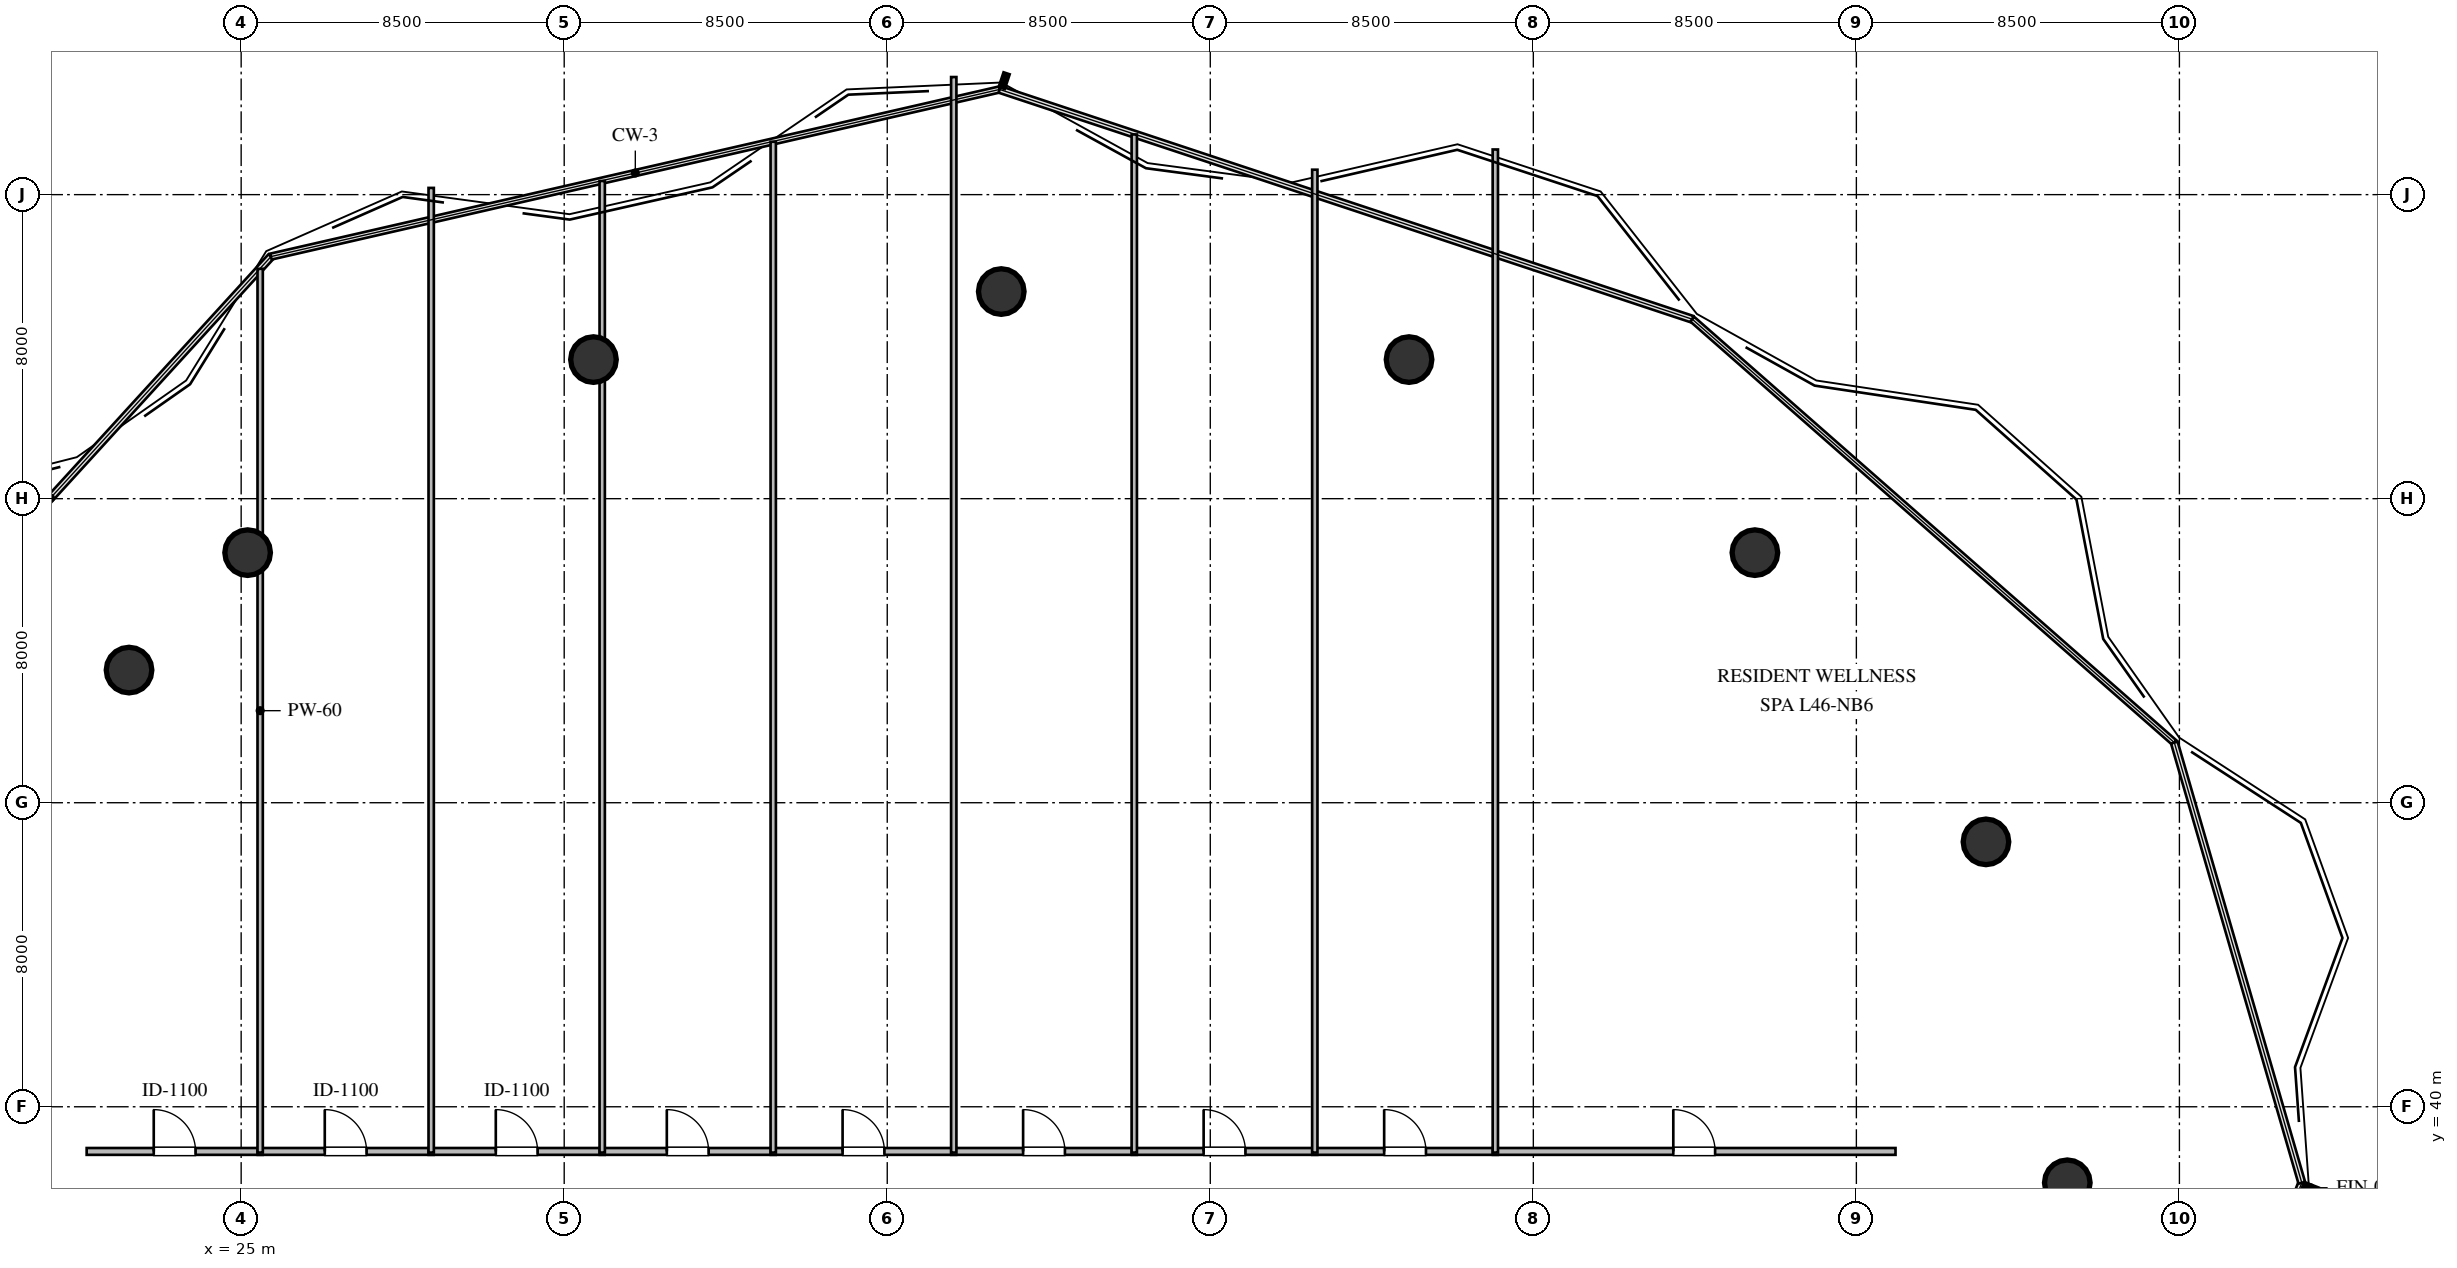
"""IFC4 building model, lengths in metres.
Left out: names, types, materials, properties, quantities, classifications, styles, units other than length and angle.
Written with IfcOpenShell. Run it as: python <this file> out.ifc"""

import sys

from ifc_helpers import new_model, si_unit, direction, frame, frame_2d, origin, origin_2d, place, context, subcontext, project, spatial, rectangle, circle, extrude, element, fill, save


model = new_model("IFC4")
c1 = context("Model", 3, precision=1e-05, world=origin(), true_north=direction((0.0, 1.0)))
c2 = subcontext(c1, "Body", "Model", "MODEL_VIEW")
j1 = project(units=[si_unit("LENGTHUNIT", "METRE"), si_unit("PLANEANGLEUNIT", "RADIAN")], contexts=[c1])
p1 = place(None, origin())
s1 = spatial("IfcSite", under=j1, at=p1, CompositionType="ELEMENT")
p2 = place(p1, origin())
s2 = spatial("IfcBuilding", under=s1, at=p2, CompositionType="ELEMENT")
p3 = place(p2, frame((0.0, 0.0, 174.6)))
s3 = spatial("IfcBuildingStorey", under=s2, at=p3, CompositionType="ELEMENT", Elevation=174.6)
for number, where, z_axis, x_axis in (
    (1, (73.05, 38.0, 0.0), (0.0, 0.0, 1.0), (1.0, 0.0, 0.0)),
    (2, (70.91, 46.97, 0.0), (0.0, 0.0, 1.0), (1.0, 0.0, 0.0)),
    (3, (64.83, 54.58, 0.0), (0.0, 0.0, 1.0), (1.0, 0.0, 0.0)),
    (4, (55.73, 59.66, 0.0), (0.0, 0.0, 1.0), (1.0, 0.0, 0.0)),
    (5, (45.0, 61.45, 0.0), (0.0, 0.0, 1.0), (1.0, 0.0, 0.0)),
    (6, (34.27, 59.66, 0.0), (0.0, 0.0, 1.0), (1.0, 0.0, 0.0)),
    (7, (25.17, 54.58, 0.0), (0.0, 0.0, 1.0), (1.0, 0.0, 0.0)),
    (8, (22.05, 51.49, 0.0), (0.0, 0.0, 1.0), (1.0, 0.0, 0.0)),
):
    element("IfcColumn", number, at=place(p3, frame(where, z_axis=z_axis, x_axis=x_axis)), inside=s3, PredefinedType="COLUMN", context=c2, shape_type="SweptSolid", body=[
        extrude(circle(Radius=0.6, at=origin_2d()), origin(), (0.0, 0.0, 1.0), 3.6),
    ])
p4 = place(p3, frame((20.935, 38.825, 0.0), z_axis=(0.0, 0.0, 1.0), x_axis=(1.0, 0.0, 0.0)))
e9 = element("IfcWall", 9, at=p4, inside=s3, PredefinedType="PARTITIONING", context=c2, shape_type="SweptSolid", body=[
    extrude(rectangle(XDim=4.63, YDim=0.18, at=frame_2d((2.315, 0.0))), origin(), (0.0, 0.0, 1.0), 3.36),
])
p5 = place(p4, frame((1.765, 0.0, 0.0)))
e10 = element("IfcOpeningElement", 10, at=p5, cuts=e9, PredefinedType="OPENING", context=c2, shape_type="SweptSolid", body=[
    extrude(rectangle(XDim=1.1, YDim=2.1, at=frame_2d((0.55, 1.05))), frame((0.0, 0.1, 0.0), z_axis=(0.0, -1.0, 0.0), x_axis=(1.0, 0.0, 0.0)), (0.0, 0.0, 1.0), 0.2),
])
p6 = place(p3, frame((25.435, 38.825, 0.0), z_axis=(0.0, 0.0, 1.0), x_axis=(1.0, 0.0, 0.0)))
e11 = element("IfcWall", 11, at=p6, inside=s3, PredefinedType="PARTITIONING", context=c2, shape_type="SweptSolid", body=[
    extrude(rectangle(XDim=4.63, YDim=0.18, at=frame_2d((2.315, 0.0))), origin(), (0.0, 0.0, 1.0), 3.36),
])
p7 = place(p6, frame((1.765, 0.0, 0.0)))
e12 = element("IfcOpeningElement", 12, at=p7, cuts=e11, PredefinedType="OPENING", context=c2, shape_type="SweptSolid", body=[
    extrude(rectangle(XDim=1.1, YDim=2.1, at=frame_2d((0.55, 1.05))), frame((0.0, 0.1, 0.0), z_axis=(0.0, -1.0, 0.0), x_axis=(1.0, 0.0, 0.0)), (0.0, 0.0, 1.0), 0.2),
])
p8 = place(p3, frame((29.935, 38.825, 0.0), z_axis=(0.0, 0.0, 1.0), x_axis=(1.0, 0.0, 0.0)))
e13 = element("IfcWall", 13, at=p8, inside=s3, PredefinedType="PARTITIONING", context=c2, shape_type="SweptSolid", body=[
    extrude(rectangle(XDim=4.63, YDim=0.18, at=frame_2d((2.315, 0.0))), origin(), (0.0, 0.0, 1.0), 3.36),
])
p9 = place(p8, frame((1.765, 0.0, 0.0)))
e14 = element("IfcOpeningElement", 14, at=p9, cuts=e13, PredefinedType="OPENING", context=c2, shape_type="SweptSolid", body=[
    extrude(rectangle(XDim=1.1, YDim=2.1, at=frame_2d((0.55, 1.05))), frame((0.0, 0.1, 0.0), z_axis=(0.0, -1.0, 0.0), x_axis=(1.0, 0.0, 0.0)), (0.0, 0.0, 1.0), 0.2),
])
p10 = place(p3, frame((34.435, 38.825, 0.0), z_axis=(0.0, 0.0, 1.0), x_axis=(1.0, 0.0, 0.0)))
e15 = element("IfcWall", 15, at=p10, inside=s3, PredefinedType="PARTITIONING", context=c2, shape_type="SweptSolid", body=[
    extrude(rectangle(XDim=4.63, YDim=0.18, at=frame_2d((2.315, 0.0))), origin(), (0.0, 0.0, 1.0), 3.36),
])
p11 = place(p10, frame((1.765, 0.0, 0.0)))
e16 = element("IfcOpeningElement", 16, at=p11, cuts=e15, PredefinedType="OPENING", context=c2, shape_type="SweptSolid", body=[
    extrude(rectangle(XDim=1.1, YDim=2.1, at=frame_2d((0.55, 1.05))), frame((0.0, 0.1, 0.0), z_axis=(0.0, -1.0, 0.0), x_axis=(1.0, 0.0, 0.0)), (0.0, 0.0, 1.0), 0.2),
])
p12 = place(p3, frame((38.935, 38.825, 0.0), z_axis=(0.0, 0.0, 1.0), x_axis=(1.0, 0.0, 0.0)))
e17 = element("IfcWall", 17, at=p12, inside=s3, PredefinedType="PARTITIONING", context=c2, shape_type="SweptSolid", body=[
    extrude(rectangle(XDim=4.88, YDim=0.18, at=frame_2d((2.44, 0.0))), origin(), (0.0, 0.0, 1.0), 3.36),
])
p13 = place(p12, frame((1.89, 0.0, 0.0)))
e18 = element("IfcOpeningElement", 18, at=p13, cuts=e17, PredefinedType="OPENING", context=c2, shape_type="SweptSolid", body=[
    extrude(rectangle(XDim=1.1, YDim=2.1, at=frame_2d((0.55, 1.05))), frame((0.0, 0.1, 0.0), z_axis=(0.0, -1.0, 0.0), x_axis=(1.0, 0.0, 0.0)), (0.0, 0.0, 1.0), 0.2),
])
p14 = place(p3, frame((43.685, 38.825, 0.0), z_axis=(0.0, 0.0, 1.0), x_axis=(1.0, 0.0, 0.0)))
e19 = element("IfcWall", 19, at=p14, inside=s3, PredefinedType="PARTITIONING", context=c2, shape_type="SweptSolid", body=[
    extrude(rectangle(XDim=4.88, YDim=0.18, at=frame_2d((2.44, 0.0))), origin(), (0.0, 0.0, 1.0), 3.36),
])
p15 = place(p14, frame((1.89, 0.0, 0.0)))
e20 = element("IfcOpeningElement", 20, at=p15, cuts=e19, PredefinedType="OPENING", context=c2, shape_type="SweptSolid", body=[
    extrude(rectangle(XDim=1.1, YDim=2.1, at=frame_2d((0.55, 1.05))), frame((0.0, 0.1, 0.0), z_axis=(0.0, -1.0, 0.0), x_axis=(1.0, 0.0, 0.0)), (0.0, 0.0, 1.0), 0.2),
])
p16 = place(p3, frame((48.435, 38.825, 0.0), z_axis=(0.0, 0.0, 1.0), x_axis=(1.0, 0.0, 0.0)))
e21 = element("IfcWall", 21, at=p16, inside=s3, PredefinedType="PARTITIONING", context=c2, shape_type="SweptSolid", body=[
    extrude(rectangle(XDim=4.88, YDim=0.18, at=frame_2d((2.44, 0.0))), origin(), (0.0, 0.0, 1.0), 3.36),
])
p17 = place(p16, frame((1.89, 0.0, 0.0)))
e22 = element("IfcOpeningElement", 22, at=p17, cuts=e21, PredefinedType="OPENING", context=c2, shape_type="SweptSolid", body=[
    extrude(rectangle(XDim=1.1, YDim=2.1, at=frame_2d((0.55, 1.05))), frame((0.0, 0.1, 0.0), z_axis=(0.0, -1.0, 0.0), x_axis=(1.0, 0.0, 0.0)), (0.0, 0.0, 1.0), 0.2),
])
p18 = place(p3, frame((53.185, 38.825, 0.0), z_axis=(0.0, 0.0, 1.0), x_axis=(1.0, 0.0, 0.0)))
e23 = element("IfcWall", 23, at=p18, inside=s3, PredefinedType="PARTITIONING", context=c2, shape_type="SweptSolid", body=[
    extrude(rectangle(XDim=4.88, YDim=0.18, at=frame_2d((2.44, 0.0))), origin(), (0.0, 0.0, 1.0), 3.36),
])
p19 = place(p18, frame((1.89, 0.0, 0.0)))
e24 = element("IfcOpeningElement", 24, at=p19, cuts=e23, PredefinedType="OPENING", context=c2, shape_type="SweptSolid", body=[
    extrude(rectangle(XDim=1.1, YDim=2.1, at=frame_2d((0.55, 1.05))), frame((0.0, 0.1, 0.0), z_axis=(0.0, -1.0, 0.0), x_axis=(1.0, 0.0, 0.0)), (0.0, 0.0, 1.0), 0.2),
])
p20 = place(p3, frame((57.935, 38.825, 0.0), z_axis=(0.0, 0.0, 1.0), x_axis=(1.0, 0.0, 0.0)))
e25 = element("IfcWall", 25, at=p20, inside=s3, PredefinedType="PARTITIONING", context=c2, shape_type="SweptSolid", body=[
    extrude(rectangle(XDim=10.595, YDim=0.18, at=frame_2d((5.297, 0.0))), origin(), (0.0, 0.0, 1.0), 3.36),
])
p21 = place(p20, frame((4.748, 0.0, 0.0)))
e26 = element("IfcOpeningElement", 26, at=p21, cuts=e25, PredefinedType="OPENING", context=c2, shape_type="SweptSolid", body=[
    extrude(rectangle(XDim=1.1, YDim=2.1, at=frame_2d((0.55, 1.05))), frame((0.0, 0.1, 0.0), z_axis=(0.0, -1.0, 0.0), x_axis=(1.0, 0.0, 0.0)), (0.0, 0.0, 1.0), 0.2),
])
p22 = place(p3, frame((25.5, 62.049, 0.0), z_axis=(0.0, 0.0, 1.0), x_axis=(0.0, -1.0, 0.0)))
e27 = element("IfcWall", 27, at=p22, inside=s3, PredefinedType="PARTITIONING", context=c2, shape_type="SweptSolid", body=[
    extrude(rectangle(XDim=23.254, YDim=0.14, at=frame_2d((11.627, 0.0))), origin(), (0.0, 0.0, 1.0), 2.806),
])
p23 = place(p3, frame((30.0, 64.177, 0.0), z_axis=(0.0, 0.0, 1.0), x_axis=(0.0, -1.0, 0.0)))
e28 = element("IfcWall", 28, at=p23, inside=s3, PredefinedType="PARTITIONING", context=c2, shape_type="SweptSolid", body=[
    extrude(rectangle(XDim=25.382, YDim=0.14, at=frame_2d((12.691, 0.0))), origin(), (0.0, 0.0, 1.0), 3.36),
])
p24 = place(p3, frame((34.5, 64.359, 0.0), z_axis=(0.0, 0.0, 1.0), x_axis=(0.0, -1.0, 0.0)))
e29 = element("IfcWall", 29, at=p24, inside=s3, PredefinedType="PARTITIONING", context=c2, shape_type="SweptSolid", body=[
    extrude(rectangle(XDim=25.564, YDim=0.14, at=frame_2d((12.782, 0.0))), origin(), (0.0, 0.0, 1.0), 2.806),
])
p25 = place(p3, frame((39.0, 65.391, 0.0), z_axis=(0.0, 0.0, 1.0), x_axis=(0.0, -1.0, 0.0)))
e30 = element("IfcWall", 30, at=p25, inside=s3, PredefinedType="PARTITIONING", context=c2, shape_type="SweptSolid", body=[
    extrude(rectangle(XDim=26.596, YDim=0.14, at=frame_2d((13.298, 0.0))), origin(), (0.0, 0.0, 1.0), 3.36),
])
p26 = place(p3, frame((43.75, 67.094, 0.0), z_axis=(0.0, 0.0, 1.0), x_axis=(0.0, -1.0, 0.0)))
e31 = element("IfcWall", 31, at=p26, inside=s3, PredefinedType="PARTITIONING", context=c2, shape_type="SweptSolid", body=[
    extrude(rectangle(XDim=28.299, YDim=0.14, at=frame_2d((14.149, 0.0))), origin(), (0.0, 0.0, 1.0), 2.806),
])
p27 = place(p3, frame((48.5, 65.583, 0.0), z_axis=(0.0, 0.0, 1.0), x_axis=(0.0, -1.0, 0.0)))
e32 = element("IfcWall", 32, at=p27, inside=s3, PredefinedType="PARTITIONING", context=c2, shape_type="SweptSolid", body=[
    extrude(rectangle(XDim=26.788, YDim=0.14, at=frame_2d((13.394, 0.0))), origin(), (0.0, 0.0, 1.0), 3.36),
])
p28 = place(p3, frame((53.25, 64.656, 0.0), z_axis=(0.0, 0.0, 1.0), x_axis=(0.0, -1.0, 0.0)))
e33 = element("IfcWall", 33, at=p28, inside=s3, PredefinedType="PARTITIONING", context=c2, shape_type="SweptSolid", body=[
    extrude(rectangle(XDim=25.861, YDim=0.14, at=frame_2d((12.931, 0.0))), origin(), (0.0, 0.0, 1.0), 3.36),
])
p29 = place(p3, frame((58.0, 65.188, 0.0), z_axis=(0.0, 0.0, 1.0), x_axis=(0.0, -1.0, 0.0)))
e34 = element("IfcWall", 34, at=p29, inside=s3, PredefinedType="PARTITIONING", context=c2, shape_type="SweptSolid", body=[
    extrude(rectangle(XDim=26.393, YDim=0.14, at=frame_2d((13.197, 0.0))), origin(), (0.0, 0.0, 1.0), 3.36),
])
p30 = place(p5, origin())
e35 = element("IfcDoor", 35, at=p30, inside=s3, OperationType="SINGLE_SWING_LEFT", PredefinedType="DOOR", context=c2, shape_type="SweptSolid", body=[
    extrude(rectangle(XDim=1.1, YDim=2.1, at=frame_2d((0.55, 1.05))), frame((0.0, 0.025, 0.0), z_axis=(0.0, -1.0, 0.0), x_axis=(1.0, 0.0, 0.0)), (0.0, 0.0, 1.0), 0.05),
])
fill(e10, e35)
p31 = place(p7, origin())
e36 = element("IfcDoor", 36, at=p31, inside=s3, OperationType="SINGLE_SWING_LEFT", PredefinedType="DOOR", context=c2, shape_type="SweptSolid", body=[
    extrude(rectangle(XDim=1.1, YDim=2.1, at=frame_2d((0.55, 1.05))), frame((0.0, 0.025, 0.0), z_axis=(0.0, -1.0, 0.0), x_axis=(1.0, 0.0, 0.0)), (0.0, 0.0, 1.0), 0.05),
])
fill(e12, e36)
p32 = place(p9, origin())
e37 = element("IfcDoor", 37, at=p32, inside=s3, OperationType="SINGLE_SWING_LEFT", PredefinedType="DOOR", context=c2, shape_type="SweptSolid", body=[
    extrude(rectangle(XDim=1.1, YDim=2.1, at=frame_2d((0.55, 1.05))), frame((0.0, 0.025, 0.0), z_axis=(0.0, -1.0, 0.0), x_axis=(1.0, 0.0, 0.0)), (0.0, 0.0, 1.0), 0.05),
])
fill(e14, e37)
p33 = place(p11, origin())
e38 = element("IfcDoor", 38, at=p33, inside=s3, OperationType="SINGLE_SWING_LEFT", PredefinedType="DOOR", context=c2, shape_type="SweptSolid", body=[
    extrude(rectangle(XDim=1.1, YDim=2.1, at=frame_2d((0.55, 1.05))), frame((0.0, 0.025, 0.0), z_axis=(0.0, -1.0, 0.0), x_axis=(1.0, 0.0, 0.0)), (0.0, 0.0, 1.0), 0.05),
])
fill(e16, e38)
p34 = place(p13, origin())
e39 = element("IfcDoor", 39, at=p34, inside=s3, OperationType="SINGLE_SWING_LEFT", PredefinedType="DOOR", context=c2, shape_type="SweptSolid", body=[
    extrude(rectangle(XDim=1.1, YDim=2.1, at=frame_2d((0.55, 1.05))), frame((0.0, 0.025, 0.0), z_axis=(0.0, -1.0, 0.0), x_axis=(1.0, 0.0, 0.0)), (0.0, 0.0, 1.0), 0.05),
])
fill(e18, e39)
p35 = place(p15, origin())
e40 = element("IfcDoor", 40, at=p35, inside=s3, OperationType="SINGLE_SWING_LEFT", PredefinedType="DOOR", context=c2, shape_type="SweptSolid", body=[
    extrude(rectangle(XDim=1.1, YDim=2.1, at=frame_2d((0.55, 1.05))), frame((0.0, 0.025, 0.0), z_axis=(0.0, -1.0, 0.0), x_axis=(1.0, 0.0, 0.0)), (0.0, 0.0, 1.0), 0.05),
])
fill(e20, e40)
p36 = place(p17, origin())
e41 = element("IfcDoor", 41, at=p36, inside=s3, OperationType="SINGLE_SWING_LEFT", PredefinedType="DOOR", context=c2, shape_type="SweptSolid", body=[
    extrude(rectangle(XDim=1.1, YDim=2.1, at=frame_2d((0.55, 1.05))), frame((0.0, 0.025, 0.0), z_axis=(0.0, -1.0, 0.0), x_axis=(1.0, 0.0, 0.0)), (0.0, 0.0, 1.0), 0.05),
])
fill(e22, e41)
p37 = place(p19, origin())
e42 = element("IfcDoor", 42, at=p37, inside=s3, OperationType="SINGLE_SWING_LEFT", PredefinedType="DOOR", context=c2, shape_type="SweptSolid", body=[
    extrude(rectangle(XDim=1.1, YDim=2.1, at=frame_2d((0.55, 1.05))), frame((0.0, 0.025, 0.0), z_axis=(0.0, -1.0, 0.0), x_axis=(1.0, 0.0, 0.0)), (0.0, 0.0, 1.0), 0.05),
])
fill(e24, e42)
p38 = place(p21, origin())
e43 = element("IfcDoor", 43, at=p38, inside=s3, OperationType="SINGLE_SWING_LEFT", PredefinedType="DOOR", context=c2, shape_type="SweptSolid", body=[
    extrude(rectangle(XDim=1.1, YDim=2.1, at=frame_2d((0.55, 1.05))), frame((0.0, 0.025, 0.0), z_axis=(0.0, -1.0, 0.0), x_axis=(1.0, 0.0, 0.0)), (0.0, 0.0, 1.0), 0.05),
])
fill(e26, e43)
save(model, sys.argv[1])
